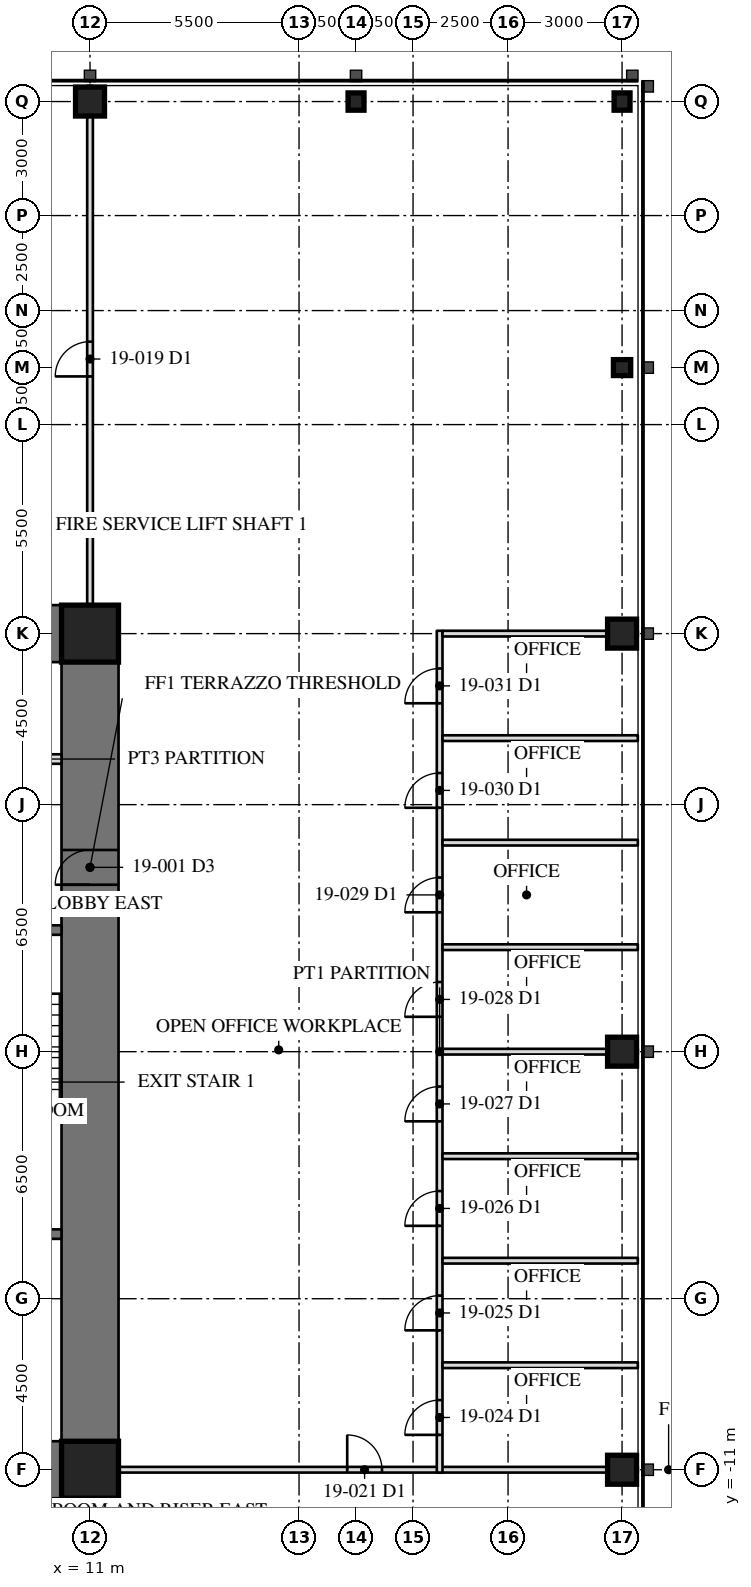
"""IFC4 building model, lengths in metres.
Left out: names, types, materials, properties, quantities, classifications, styles, units other than length and angle.
Written with IfcOpenShell. Run it as: python <this file> out.ifc"""

import sys

from ifc_helpers import new_model, si_unit, direction, frame, frame_2d, origin, origin_2d, place, context, subcontext, project, spatial, rectangle, hollow_rectangle, i_section, extrude, element, fill, save


model = new_model("IFC4")
c1 = context("Model", 3, precision=1e-05, world=origin(), true_north=direction((0.0, 1.0)))
c2 = subcontext(c1, "Body", "Model", "MODEL_VIEW")
j1 = project(units=[si_unit("LENGTHUNIT", "METRE"), si_unit("PLANEANGLEUNIT", "RADIAN")], contexts=[c1])
p1 = place(None, origin())
s1 = spatial("IfcSite", under=j1, at=p1, CompositionType="ELEMENT")
p2 = place(p1, origin())
s2 = spatial("IfcBuilding", under=s1, at=p2, CompositionType="ELEMENT")
p3 = place(p2, frame((0.0, 0.0, 81.6)))
s3 = spatial("IfcBuildingStorey", under=s2, at=p3, CompositionType="ELEMENT", Elevation=81.6)
for number, where, z_axis, x_axis in (
    (1, (25.0, -11.0, 0.0), (0.0, 0.0, 1.0), (0.0, 1.0, 0.0)),
    (2, (25.0, 0.0, 0.0), (0.0, 0.0, 1.0), (0.0, 1.0, 0.0)),
    (3, (25.0, 11.0, 0.0), (0.0, 0.0, 1.0), (0.0, 1.0, 0.0)),
):
    element("IfcColumn", number, at=place(p3, frame(where, z_axis=z_axis, x_axis=x_axis)), inside=s3, PredefinedType="COLUMN", context=c2, shape_type="SweptSolid", body=[
        extrude(hollow_rectangle(XDim=0.762, YDim=0.762, WallThickness=0.127, at=origin_2d()), origin(), (0.0, 0.0, 1.0), 4.1),
    ])
for number, where, z_axis, x_axis in (
    (4, (25.0, 18.0, 0.0), (0.0, 0.0, 1.0), (0.0, 1.0, 0.0)),
    (5, (25.0, 25.0, 0.0), (0.0, 0.0, 1.0), (1.0, 0.0, 0.0)),
    (6, (18.0, 25.0, 0.0), (0.0, 0.0, 1.0), (1.0, 0.0, 0.0)),
):
    element("IfcColumn", number, at=place(p3, frame(where, z_axis=z_axis, x_axis=x_axis)), inside=s3, PredefinedType="COLUMN", context=c2, shape_type="SweptSolid", body=[
        extrude(i_section(OverallWidth=0.419, OverallDepth=0.455, WebThickness=0.042, FlangeThickness=0.068, at=origin_2d()), origin(), (0.0, 0.0, 1.0), 4.1),
    ])
p4 = place(p3, frame((11.0, 25.0, 0.0), z_axis=(0.0, 0.0, 1.0), x_axis=(1.0, 0.0, 0.0)))
e7 = element("IfcColumn", 7, at=p4, inside=s3, PredefinedType="COLUMN", context=c2, shape_type="SweptSolid", body=[
    extrude(hollow_rectangle(XDim=0.762, YDim=0.762, WallThickness=0.127, at=origin_2d()), origin(), (0.0, 0.0, 1.0), 4.1),
])
p5 = place(p3, frame((11.0, -11.0, 0.0), z_axis=(0.0, 0.0, 1.0), x_axis=(0.0, 1.0, 0.0)))
e8 = element("IfcWall", 8, at=p5, inside=s3, PredefinedType="SHEAR", context=c2, shape_type="SweptSolid", body=[
    extrude(rectangle(XDim=22.0, YDim=1.5, at=frame_2d((11.0, 0.0))), origin(), (0.0, 0.0, 1.0), 4.1),
])
p6 = place(p5, frame((15.393, 0.0, 0.0)))
e9 = element("IfcOpeningElement", 9, at=p6, cuts=e8, PredefinedType="OPENING", context=c2, shape_type="SweptSolid", body=[
    extrude(rectangle(XDim=0.915, YDim=2.134, at=frame_2d((0.458, 1.067))), frame((0.0, 0.76, 0.0), z_axis=(0.0, -1.0, 0.0), x_axis=(1.0, 0.0, 0.0)), (0.0, 0.0, 1.0), 1.52),
])
for number, where, z_axis, x_axis in (
    (10, (11.0, 11.0, 0.0), (0.0, 0.0, 1.0), (-1.0, 0.0, 0.0)),
    (11, (6.5, -11.0, 0.0), (0.0, 0.0, 1.0), (1.0, 0.0, 0.0)),
):
    element("IfcWall", number, at=place(p3, frame(where, z_axis=z_axis, x_axis=x_axis)), inside=s3, PredefinedType="SHEAR", context=c2, shape_type="SweptSolid", body=[
        extrude(rectangle(XDim=4.5, YDim=1.5, at=frame_2d((2.25, 0.0))), origin(), (0.0, 0.0, 1.0), 4.1),
    ])
for number, where, z_axis, x_axis in (
    (12, (11.0, 11.0, 0.0), (0.0, 0.0, 1.0), (1.0, 0.0, 0.0)),
    (13, (11.0, -11.0, 0.0), (0.0, 0.0, 1.0), (1.0, 0.0, 0.0)),
):
    element("IfcColumn", number, at=place(p3, frame(where, z_axis=z_axis, x_axis=x_axis)), inside=s3, PredefinedType="COLUMN", context=c2, shape_type="SweptSolid", body=[
        extrude(hollow_rectangle(XDim=1.499, YDim=1.499, WallThickness=0.102, at=origin_2d()), origin(), (0.0, 0.0, 1.0), 4.1),
    ])
p7 = place(p3, frame((6.95, -4.8, 0.0), z_axis=(0.0, 0.0, 1.0), x_axis=(1.0, 0.0, 0.0)))
e14 = element("IfcWall", 14, at=p7, inside=s3, PredefinedType="SOLIDWALL", context=c2, shape_type="SweptSolid", body=[
    extrude(rectangle(XDim=3.3, YDim=0.25, at=frame_2d((1.65, 0.0))), origin(), (0.0, 0.0, 1.0), 3.91),
])
p8 = place(p3, frame((6.95, 3.2, 0.0), z_axis=(0.0, 0.0, 1.0), x_axis=(1.0, 0.0, 0.0)))
e15 = element("IfcWall", 15, at=p8, inside=s3, PredefinedType="SOLIDWALL", context=c2, shape_type="SweptSolid", body=[
    extrude(rectangle(XDim=3.3, YDim=0.25, at=frame_2d((1.65, 0.0))), origin(), (0.0, 0.0, 1.0), 3.91),
])
p9 = place(p8, frame((1.116, 0.0, 0.0)))
e16 = element("IfcOpeningElement", 16, at=p9, cuts=e15, PredefinedType="OPENING", context=c2, shape_type="SweptSolid", body=[
    extrude(rectangle(XDim=1.067, YDim=2.134, at=frame_2d((0.533, 1.067))), frame((0.0, 0.135, 0.0), z_axis=(0.0, -1.0, 0.0), x_axis=(1.0, 0.0, 0.0)), (0.0, 0.0, 1.0), 0.27),
])
p10 = place(p3, frame((6.95, 7.7, 0.0), z_axis=(0.0, 0.0, 1.0), x_axis=(1.0, 0.0, 0.0)))
e17 = element("IfcWall", 17, at=p10, inside=s3, PredefinedType="PARTITIONING", context=c2, shape_type="SweptSolid", body=[
    extrude(rectangle(XDim=3.3, YDim=0.25, at=frame_2d((1.65, 0.0))), origin(), (0.0, 0.0, 1.0), 3.91),
])
p11 = place(p10, frame((0.45, 0.0, 0.0)))
e18 = element("IfcOpeningElement", 18, at=p11, cuts=e17, PredefinedType="OPENING", context=c2, shape_type="SweptSolid", body=[
    extrude(rectangle(XDim=1.219, YDim=2.134, at=frame_2d((0.609, 1.067))), frame((0.0, 0.135, 0.0), z_axis=(0.0, -1.0, 0.0), x_axis=(1.0, 0.0, 0.0)), (0.0, 0.0, 1.0), 0.27),
])
p12 = place(p3, frame((11.0, 11.75, 0.0), z_axis=(0.0, 0.0, 1.0), x_axis=(0.0, 1.0, 0.0)))
e19 = element("IfcWall", 19, at=p12, inside=s3, PredefinedType="PARTITIONING", context=c2, shape_type="SweptSolid", body=[
    extrude(rectangle(XDim=13.665, YDim=0.15, at=frame_2d((6.833, 0.0))), origin(), (0.0, 0.0, 1.0), 3.13),
])
p13 = place(p12, frame((6.018, 0.0, 0.0)))
e20 = element("IfcOpeningElement", 20, at=p13, cuts=e19, PredefinedType="OPENING", context=c2, shape_type="SweptSolid", body=[
    extrude(rectangle(XDim=0.915, YDim=2.134, at=frame_2d((0.458, 1.067))), frame((0.0, 0.085, 0.0), z_axis=(0.0, -1.0, 0.0), x_axis=(1.0, 0.0, 0.0)), (0.0, 0.0, 1.0), 0.17),
])
p14 = place(p3, frame((11.75, -11.0, 0.0), z_axis=(0.0, 0.0, 1.0), x_axis=(1.0, 0.0, 0.0)))
e21 = element("IfcWall", 21, at=p14, inside=s3, PredefinedType="PARTITIONING", context=c2, shape_type="SweptSolid", body=[
    extrude(rectangle(XDim=13.665, YDim=0.15, at=frame_2d((6.833, 0.0))), origin(), (0.0, 0.0, 1.0), 3.13),
])
p15 = place(p14, frame((6.018, 0.0, 0.0)))
e22 = element("IfcOpeningElement", 22, at=p15, cuts=e21, PredefinedType="OPENING", context=c2, shape_type="SweptSolid", body=[
    extrude(rectangle(XDim=0.915, YDim=2.134, at=frame_2d((0.458, 1.067))), frame((0.0, 0.085, 0.0), z_axis=(0.0, -1.0, 0.0), x_axis=(1.0, 0.0, 0.0)), (0.0, 0.0, 1.0), 0.17),
])
p16 = place(p3, frame((20.2, -11.075, 0.0), z_axis=(0.0, 0.0, 1.0), x_axis=(0.0, 1.0, 0.0)))
e23 = element("IfcWall", 23, at=p16, inside=s3, PredefinedType="PARTITIONING", context=c2, shape_type="SweptSolid", body=[
    extrude(rectangle(XDim=22.15, YDim=0.15, at=frame_2d((11.075, 0.0))), origin(), (0.0, 0.0, 1.0), 3.91),
])
p17 = place(p16, frame((0.992, 0.0, 0.0)))
e24 = element("IfcOpeningElement", 24, at=p17, cuts=e23, PredefinedType="OPENING", context=c2, shape_type="SweptSolid", body=[
    extrude(rectangle(XDim=0.915, YDim=2.134, at=frame_2d((0.458, 1.067))), frame((0.0, 0.085, 0.0), z_axis=(0.0, -1.0, 0.0), x_axis=(1.0, 0.0, 0.0)), (0.0, 0.0, 1.0), 0.17),
])
p18 = place(p16, frame((3.742, 0.0, 0.0)))
e25 = element("IfcOpeningElement", 25, at=p18, cuts=e23, PredefinedType="OPENING", context=c2, shape_type="SweptSolid", body=[
    extrude(rectangle(XDim=0.915, YDim=2.134, at=frame_2d((0.458, 1.067))), frame((0.0, 0.085, 0.0), z_axis=(0.0, -1.0, 0.0), x_axis=(1.0, 0.0, 0.0)), (0.0, 0.0, 1.0), 0.17),
])
p19 = place(p16, frame((6.492, 0.0, 0.0)))
e26 = element("IfcOpeningElement", 26, at=p19, cuts=e23, PredefinedType="OPENING", context=c2, shape_type="SweptSolid", body=[
    extrude(rectangle(XDim=0.915, YDim=2.134, at=frame_2d((0.458, 1.067))), frame((0.0, 0.085, 0.0), z_axis=(0.0, -1.0, 0.0), x_axis=(1.0, 0.0, 0.0)), (0.0, 0.0, 1.0), 0.17),
])
p20 = place(p16, frame((9.242, 0.0, 0.0)))
e27 = element("IfcOpeningElement", 27, at=p20, cuts=e23, PredefinedType="OPENING", context=c2, shape_type="SweptSolid", body=[
    extrude(rectangle(XDim=0.915, YDim=2.134, at=frame_2d((0.458, 1.067))), frame((0.0, 0.085, 0.0), z_axis=(0.0, -1.0, 0.0), x_axis=(1.0, 0.0, 0.0)), (0.0, 0.0, 1.0), 0.17),
])
p21 = place(p16, frame((11.992, 0.0, 0.0)))
e28 = element("IfcOpeningElement", 28, at=p21, cuts=e23, PredefinedType="OPENING", context=c2, shape_type="SweptSolid", body=[
    extrude(rectangle(XDim=0.915, YDim=2.134, at=frame_2d((0.458, 1.067))), frame((0.0, 0.085, 0.0), z_axis=(0.0, -1.0, 0.0), x_axis=(1.0, 0.0, 0.0)), (0.0, 0.0, 1.0), 0.17),
])
p22 = place(p16, frame((14.742, 0.0, 0.0)))
e29 = element("IfcOpeningElement", 29, at=p22, cuts=e23, PredefinedType="OPENING", context=c2, shape_type="SweptSolid", body=[
    extrude(rectangle(XDim=0.915, YDim=2.134, at=frame_2d((0.458, 1.067))), frame((0.0, 0.085, 0.0), z_axis=(0.0, -1.0, 0.0), x_axis=(1.0, 0.0, 0.0)), (0.0, 0.0, 1.0), 0.17),
])
p23 = place(p16, frame((17.492, 0.0, 0.0)))
e30 = element("IfcOpeningElement", 30, at=p23, cuts=e23, PredefinedType="OPENING", context=c2, shape_type="SweptSolid", body=[
    extrude(rectangle(XDim=0.915, YDim=2.134, at=frame_2d((0.458, 1.067))), frame((0.0, 0.085, 0.0), z_axis=(0.0, -1.0, 0.0), x_axis=(1.0, 0.0, 0.0)), (0.0, 0.0, 1.0), 0.17),
])
p24 = place(p16, frame((20.242, 0.0, 0.0)))
e31 = element("IfcOpeningElement", 31, at=p24, cuts=e23, PredefinedType="OPENING", context=c2, shape_type="SweptSolid", body=[
    extrude(rectangle(XDim=0.915, YDim=2.134, at=frame_2d((0.458, 1.067))), frame((0.0, 0.085, 0.0), z_axis=(0.0, -1.0, 0.0), x_axis=(1.0, 0.0, 0.0)), (0.0, 0.0, 1.0), 0.17),
])
for number, where, z_axis, x_axis in (
    (32, (20.275, -8.25, 0.0), (0.0, 0.0, 1.0), (1.0, 0.0, 0.0)),
    (33, (20.275, -5.5, 0.0), (0.0, 0.0, 1.0), (1.0, 0.0, 0.0)),
    (34, (20.275, -2.75, 0.0), (0.0, 0.0, 1.0), (1.0, 0.0, 0.0)),
):
    element("IfcWall", number, at=place(p3, frame(where, z_axis=z_axis, x_axis=x_axis)), inside=s3, PredefinedType="PARTITIONING", context=c2, shape_type="SweptSolid", body=[
        extrude(rectangle(XDim=5.14, YDim=0.15, at=frame_2d((2.57, 0.0))), origin(), (0.0, 0.0, 1.0), 3.91),
    ])
p25 = place(p3, frame((20.275, 0.0, 0.0), z_axis=(0.0, 0.0, 1.0), x_axis=(1.0, 0.0, 0.0)))
e35 = element("IfcWall", 35, at=p25, inside=s3, PredefinedType="PARTITIONING", context=c2, shape_type="SweptSolid", body=[
    extrude(rectangle(XDim=5.14, YDim=0.15, at=frame_2d((2.57, 0.0))), origin(), (0.0, 0.0, 1.0), 3.13),
])
for number, where, z_axis, x_axis in (
    (36, (20.275, 2.75, 0.0), (0.0, 0.0, 1.0), (1.0, 0.0, 0.0)),
    (37, (20.275, 5.5, 0.0), (0.0, 0.0, 1.0), (1.0, 0.0, 0.0)),
    (38, (20.275, 8.25, 0.0), (0.0, 0.0, 1.0), (1.0, 0.0, 0.0)),
):
    element("IfcWall", number, at=place(p3, frame(where, z_axis=z_axis, x_axis=x_axis)), inside=s3, PredefinedType="PARTITIONING", context=c2, shape_type="SweptSolid", body=[
        extrude(rectangle(XDim=5.14, YDim=0.15, at=frame_2d((2.57, 0.0))), origin(), (0.0, 0.0, 1.0), 3.91),
    ])
p26 = place(p3, frame((20.275, 11.0, 0.0), z_axis=(0.0, 0.0, 1.0), x_axis=(1.0, 0.0, 0.0)))
e39 = element("IfcWall", 39, at=p26, inside=s3, PredefinedType="PARTITIONING", context=c2, shape_type="SweptSolid", body=[
    extrude(rectangle(XDim=5.14, YDim=0.15, at=frame_2d((2.57, 0.0))), origin(), (0.0, 0.0, 1.0), 3.13),
])
p27 = place(p6, origin())
e40 = element("IfcDoor", 40, at=p27, inside=s3, OperationType="SINGLE_SWING_RIGHT", PredefinedType="DOOR", context=c2, shape_type="SweptSolid", body=[
    extrude(rectangle(XDim=0.915, YDim=2.134, at=frame_2d((0.458, 1.067))), frame((0.0, -0.675, 0.0), z_axis=(0.0, -1.0, 0.0), x_axis=(1.0, 0.0, 0.0)), (0.0, 0.0, 1.0), 0.05),
])
fill(e9, e40)
p28 = place(p13, origin())
e41 = element("IfcDoor", 41, at=p28, inside=s3, OperationType="SINGLE_SWING_LEFT", PredefinedType="DOOR", context=c2, shape_type="SweptSolid", body=[
    extrude(rectangle(XDim=0.915, YDim=2.134, at=frame_2d((0.458, 1.067))), frame((0.0, 0.025, 0.0), z_axis=(0.0, -1.0, 0.0), x_axis=(1.0, 0.0, 0.0)), (0.0, 0.0, 1.0), 0.05),
])
fill(e20, e41)
p29 = place(p15, origin())
e42 = element("IfcDoor", 42, at=p29, inside=s3, OperationType="SINGLE_SWING_LEFT", PredefinedType="DOOR", context=c2, shape_type="SweptSolid", body=[
    extrude(rectangle(XDim=0.915, YDim=2.134, at=frame_2d((0.458, 1.067))), frame((0.0, 0.025, 0.0), z_axis=(0.0, -1.0, 0.0), x_axis=(1.0, 0.0, 0.0)), (0.0, 0.0, 1.0), 0.05),
])
fill(e22, e42)
p30 = place(p17, origin())
e43 = element("IfcDoor", 43, at=p30, inside=s3, OperationType="SINGLE_SWING_LEFT", PredefinedType="DOOR", context=c2, shape_type="SweptSolid", body=[
    extrude(rectangle(XDim=0.915, YDim=2.134, at=frame_2d((0.458, 1.067))), frame((0.0, 0.025, 0.0), z_axis=(0.0, -1.0, 0.0), x_axis=(1.0, 0.0, 0.0)), (0.0, 0.0, 1.0), 0.05),
])
fill(e24, e43)
p31 = place(p18, origin())
e44 = element("IfcDoor", 44, at=p31, inside=s3, OperationType="SINGLE_SWING_LEFT", PredefinedType="DOOR", context=c2, shape_type="SweptSolid", body=[
    extrude(rectangle(XDim=0.915, YDim=2.134, at=frame_2d((0.458, 1.067))), frame((0.0, 0.025, 0.0), z_axis=(0.0, -1.0, 0.0), x_axis=(1.0, 0.0, 0.0)), (0.0, 0.0, 1.0), 0.05),
])
fill(e25, e44)
p32 = place(p19, origin())
e45 = element("IfcDoor", 45, at=p32, inside=s3, OperationType="SINGLE_SWING_LEFT", PredefinedType="DOOR", context=c2, shape_type="SweptSolid", body=[
    extrude(rectangle(XDim=0.915, YDim=2.134, at=frame_2d((0.458, 1.067))), frame((0.0, 0.025, 0.0), z_axis=(0.0, -1.0, 0.0), x_axis=(1.0, 0.0, 0.0)), (0.0, 0.0, 1.0), 0.05),
])
fill(e26, e45)
p33 = place(p20, origin())
e46 = element("IfcDoor", 46, at=p33, inside=s3, OperationType="SINGLE_SWING_LEFT", PredefinedType="DOOR", context=c2, shape_type="SweptSolid", body=[
    extrude(rectangle(XDim=0.915, YDim=2.134, at=frame_2d((0.458, 1.067))), frame((0.0, 0.025, 0.0), z_axis=(0.0, -1.0, 0.0), x_axis=(1.0, 0.0, 0.0)), (0.0, 0.0, 1.0), 0.05),
])
fill(e27, e46)
p34 = place(p21, origin())
e47 = element("IfcDoor", 47, at=p34, inside=s3, OperationType="SINGLE_SWING_LEFT", PredefinedType="DOOR", context=c2, shape_type="SweptSolid", body=[
    extrude(rectangle(XDim=0.915, YDim=2.134, at=frame_2d((0.458, 1.067))), frame((0.0, 0.025, 0.0), z_axis=(0.0, -1.0, 0.0), x_axis=(1.0, 0.0, 0.0)), (0.0, 0.0, 1.0), 0.05),
])
fill(e28, e47)
p35 = place(p22, origin())
e48 = element("IfcDoor", 48, at=p35, inside=s3, OperationType="SINGLE_SWING_LEFT", PredefinedType="DOOR", context=c2, shape_type="SweptSolid", body=[
    extrude(rectangle(XDim=0.915, YDim=2.134, at=frame_2d((0.458, 1.067))), frame((0.0, 0.025, 0.0), z_axis=(0.0, -1.0, 0.0), x_axis=(1.0, 0.0, 0.0)), (0.0, 0.0, 1.0), 0.05),
])
fill(e29, e48)
p36 = place(p23, origin())
e49 = element("IfcDoor", 49, at=p36, inside=s3, OperationType="SINGLE_SWING_LEFT", PredefinedType="DOOR", context=c2, shape_type="SweptSolid", body=[
    extrude(rectangle(XDim=0.915, YDim=2.134, at=frame_2d((0.458, 1.067))), frame((0.0, 0.025, 0.0), z_axis=(0.0, -1.0, 0.0), x_axis=(1.0, 0.0, 0.0)), (0.0, 0.0, 1.0), 0.05),
])
fill(e30, e49)
p37 = place(p24, origin())
e50 = element("IfcDoor", 50, at=p37, inside=s3, OperationType="SINGLE_SWING_LEFT", PredefinedType="DOOR", context=c2, shape_type="SweptSolid", body=[
    extrude(rectangle(XDim=0.915, YDim=2.134, at=frame_2d((0.458, 1.067))), frame((0.0, 0.025, 0.0), z_axis=(0.0, -1.0, 0.0), x_axis=(1.0, 0.0, 0.0)), (0.0, 0.0, 1.0), 0.05),
])
fill(e31, e50)
save(model, sys.argv[1])
